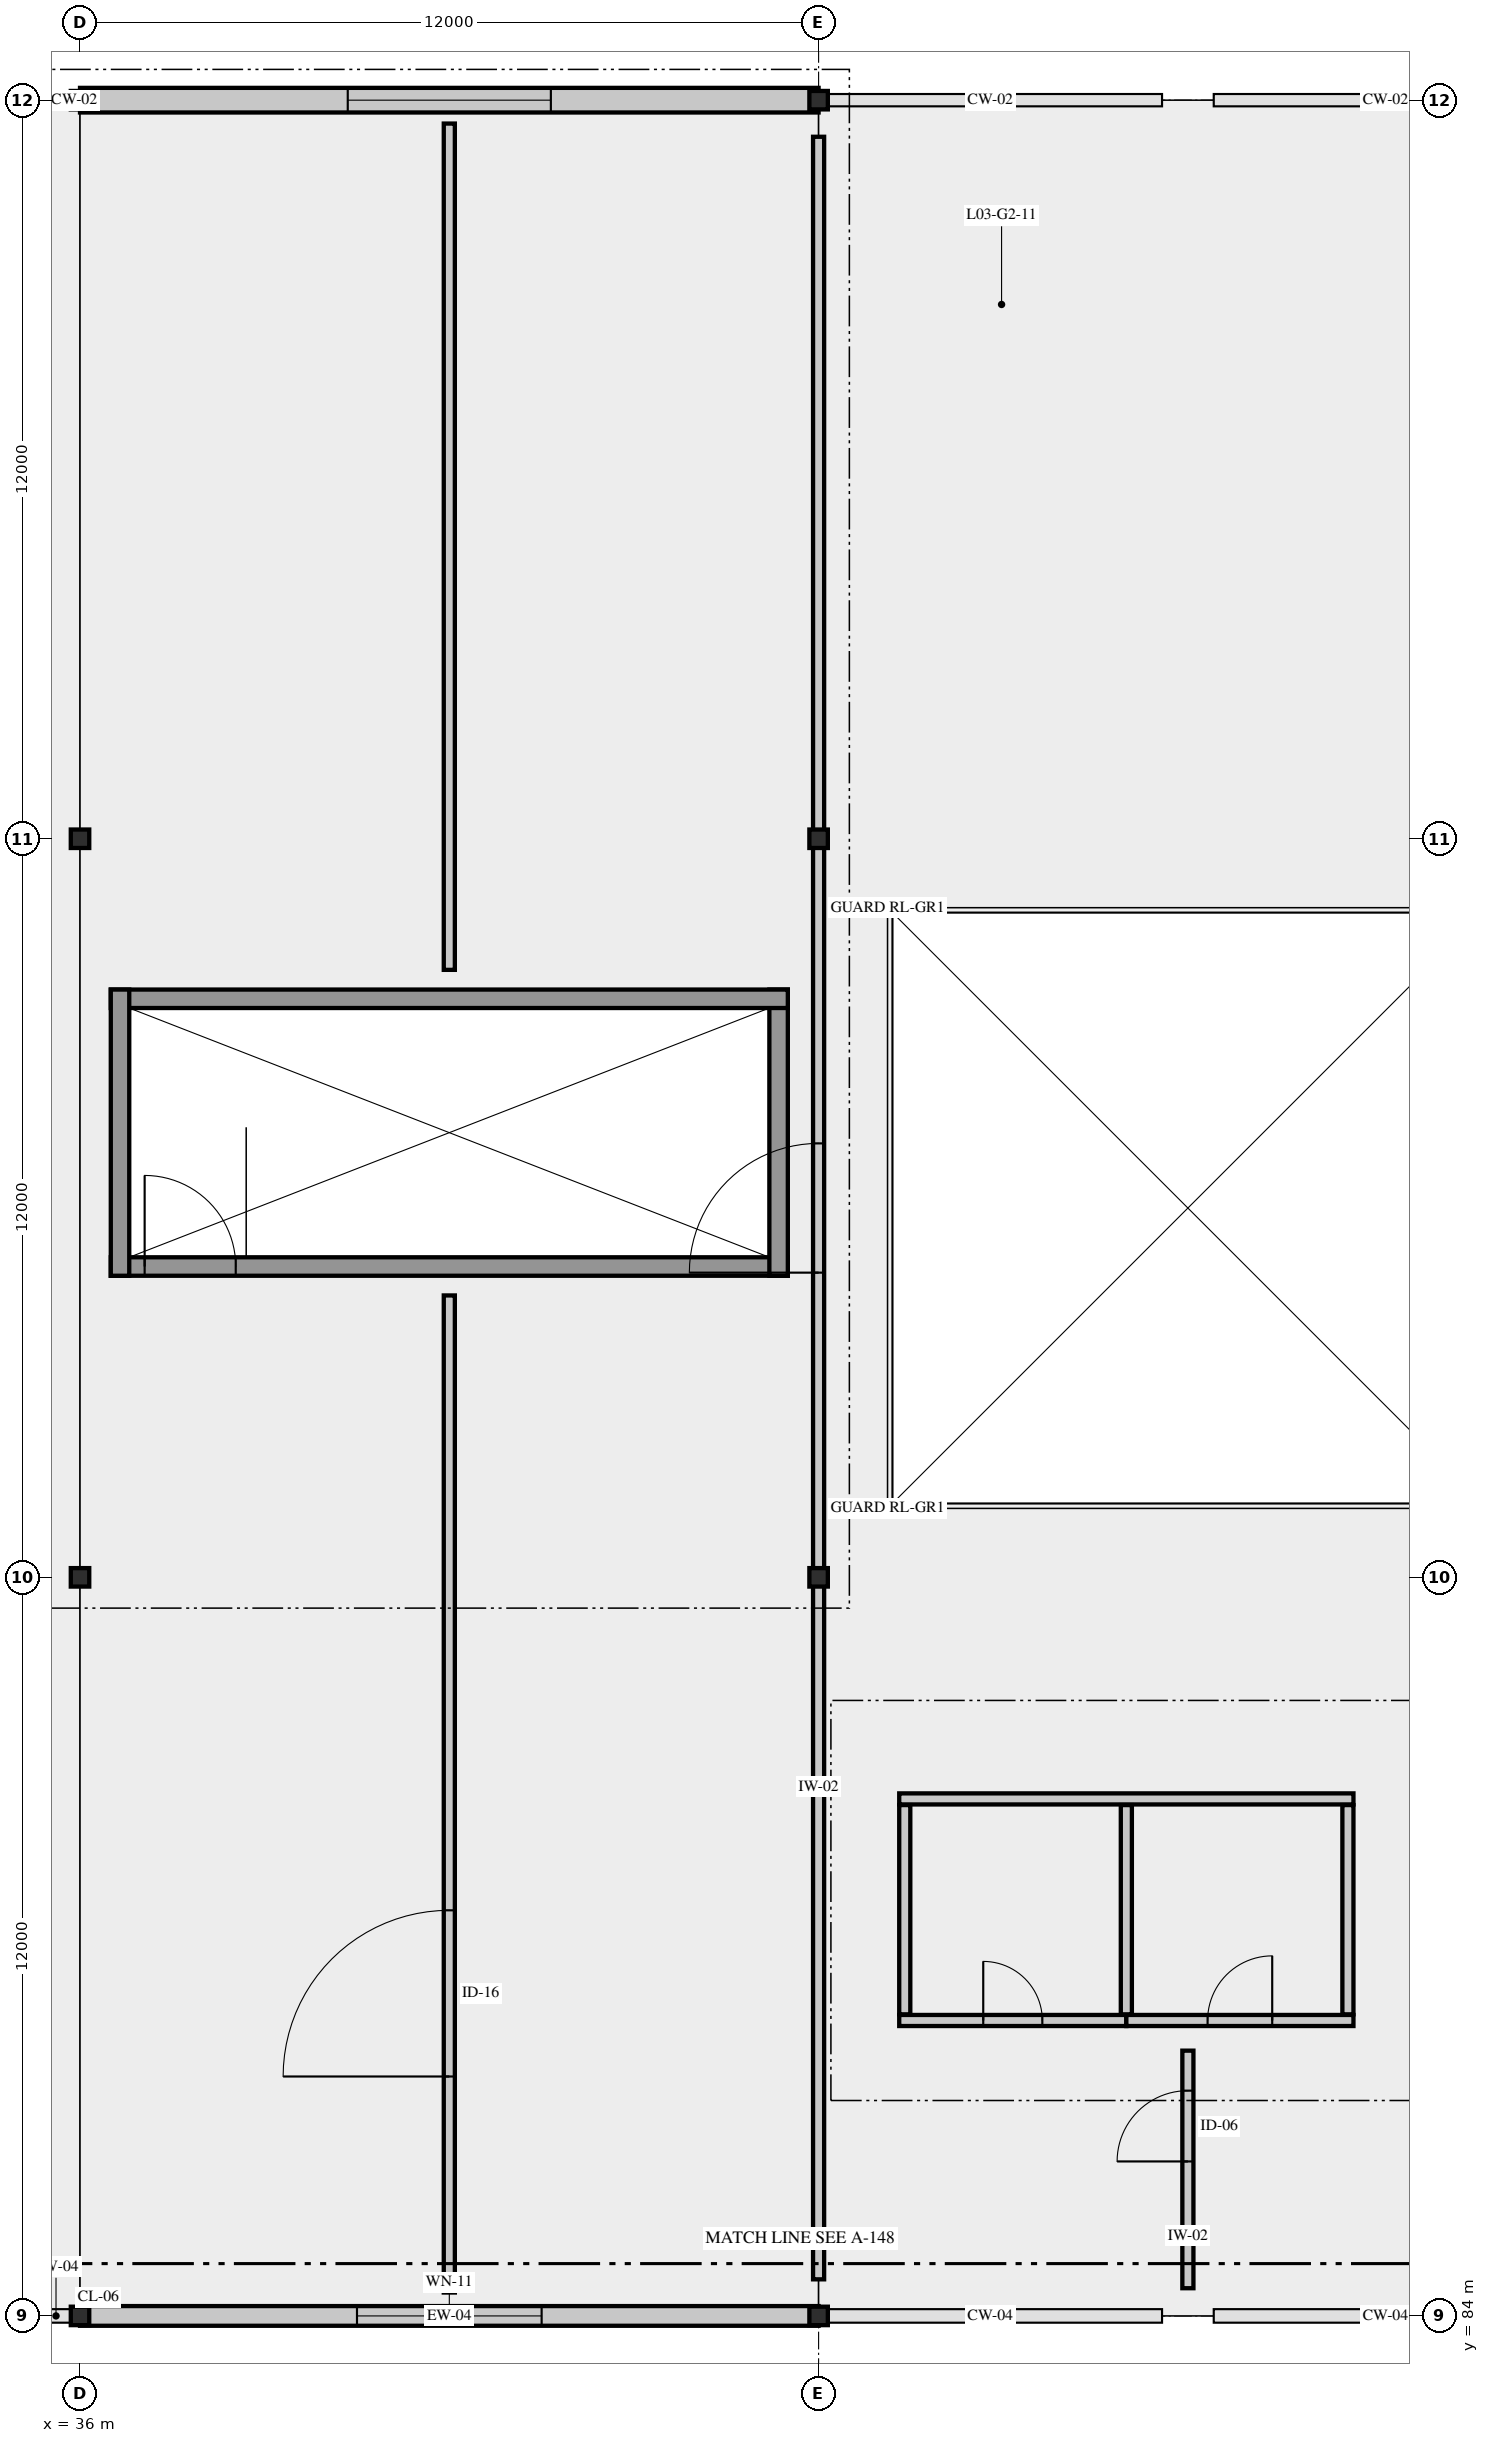
"""IFC4 building model, lengths in metres.
Left out: names, types, materials, properties, quantities, classifications, styles, units other than length and angle.
Written with IfcOpenShell. Run it as: python <this file> out.ifc"""

import sys

from ifc_helpers import new_model, si_unit, direction, frame, frame_2d, origin, origin_2d, place, context, subcontext, project, spatial, rectangle, i_section, extrude, element, fill, save


model = new_model("IFC4")
c1 = context("Model", 3, precision=1e-05, world=origin(), true_north=direction((0.0, 1.0)))
c2 = subcontext(c1, "Body", "Model", "MODEL_VIEW")
j1 = project(units=[si_unit("LENGTHUNIT", "METRE"), si_unit("PLANEANGLEUNIT", "RADIAN")], contexts=[c1])
p1 = place(None, origin())
s1 = spatial("IfcSite", under=j1, at=p1, CompositionType="ELEMENT")
p2 = place(p1, origin())
s2 = spatial("IfcBuilding", under=s1, at=p2, CompositionType="ELEMENT")
p3 = place(p2, frame((0.0, 0.0, 16.8)))
s3 = spatial("IfcBuildingStorey", under=s2, at=p3, CompositionType="ELEMENT", Elevation=16.8)
for number, where, z_axis, x_axis in (
    (1, (36.0, 84.0, 0.0), (0.0, 0.0, 1.0), (1.0, 0.0, 0.0)),
    (2, (36.0, 96.0, 0.0), (0.0, 0.0, 1.0), (1.0, 0.0, 0.0)),
    (3, (36.0, 108.0, 0.0), (0.0, 0.0, 1.0), (1.0, 0.0, 0.0)),
    (4, (36.0, 120.0, 0.0), (0.0, 0.0, 1.0), (1.0, 0.0, 0.0)),
    (5, (48.0, 84.0, 0.0), (0.0, 0.0, 1.0), (1.0, 0.0, 0.0)),
    (6, (48.0, 96.0, 0.0), (0.0, 0.0, 1.0), (1.0, 0.0, 0.0)),
    (7, (48.0, 108.0, 0.0), (0.0, 0.0, 1.0), (1.0, 0.0, 0.0)),
    (8, (48.0, 120.0, 0.0), (0.0, 0.0, 1.0), (1.0, 0.0, 0.0)),
):
    element("IfcColumn", number, at=place(p3, frame(where, z_axis=z_axis, x_axis=x_axis)), inside=s3, PredefinedType="COLUMN", context=c2, shape_type="SweptSolid", body=[
        extrude(i_section(OverallWidth=0.3, OverallDepth=0.3, WebThickness=0.011, FlangeThickness=0.019, FilletRadius=0.027, at=origin_2d()), origin(), (0.0, 0.0, 1.0), 6.6),
    ])
p4 = place(p3, frame((36.0, 84.0, 0.0), z_axis=(0.0, 0.0, 1.0), x_axis=(1.0, 0.0, 0.0)))
e9 = element("IfcWall", 9, at=p4, inside=s3, PredefinedType="SOLIDWALL", context=c2, shape_type="SweptSolid", body=[
    extrude(rectangle(XDim=12.0, YDim=0.32, at=frame_2d((6.0, 0.0))), origin(), (0.0, 0.0, 1.0), 5.6),
])
p5 = place(p4, frame((4.5, 0.0, 0.95)))
e10 = element("IfcOpeningElement", 10, at=p5, cuts=e9, PredefinedType="OPENING", context=c2, shape_type="SweptSolid", body=[
    extrude(rectangle(XDim=3.0, YDim=1.5, at=frame_2d((1.5, 0.75))), frame((0.0, 0.17, 0.0), z_axis=(0.0, -1.0, 0.0), x_axis=(1.0, 0.0, 0.0)), (0.0, 0.0, 1.0), 0.34),
])
p6 = place(p3, frame((48.0, 120.0, 0.0), z_axis=(0.0, 0.0, 1.0), x_axis=(-1.0, 0.0, 0.0)))
e11 = element("IfcWall", 11, at=p6, inside=s3, PredefinedType="SOLIDWALL", context=c2, shape_type="SweptSolid", body=[
    extrude(rectangle(XDim=12.0, YDim=0.4, at=frame_2d((6.0, 0.0))), origin(), (0.0, 0.0, 1.0), 5.75),
])
p7 = place(p6, frame((4.35, 0.0, 0.95)))
e12 = element("IfcOpeningElement", 12, at=p7, cuts=e11, PredefinedType="OPENING", context=c2, shape_type="SweptSolid", body=[
    extrude(rectangle(XDim=3.3, YDim=1.5, at=frame_2d((1.65, 0.75))), frame((0.0, 0.21, 0.0), z_axis=(0.0, -1.0, 0.0), x_axis=(1.0, 0.0, 0.0)), (0.0, 0.0, 1.0), 0.42),
])
p8 = place(p3, frame((36.5, 101.05, 0.0), z_axis=(0.0, 0.0, 1.0), x_axis=(1.0, 0.0, 0.0)))
e13 = element("IfcWall", 13, at=p8, inside=s3, PredefinedType="SHEAR", context=c2, shape_type="SweptSolid", body=[
    extrude(rectangle(XDim=11.0, YDim=0.3, at=frame_2d((5.5, 0.0))), origin(), (0.0, 0.0, 1.0), 6.35),
])
p9 = place(p8, frame((0.55, 0.0, 0.0)))
e14 = element("IfcOpeningElement", 14, at=p9, cuts=e13, PredefinedType="OPENING", context=c2, shape_type="SweptSolid", body=[
    extrude(rectangle(XDim=1.48, YDim=2.3, at=frame_2d((0.74, 1.15))), frame((0.0, 0.16, 0.0), z_axis=(0.0, -1.0, 0.0), x_axis=(1.0, 0.0, 0.0)), (0.0, 0.0, 1.0), 0.32),
])
p10 = place(p3, frame((47.35, 100.9, 0.0), z_axis=(0.0, 0.0, 1.0), x_axis=(0.0, 1.0, 0.0)))
e15 = element("IfcWall", 15, at=p10, inside=s3, PredefinedType="SHEAR", context=c2, shape_type="SweptSolid", body=[
    extrude(rectangle(XDim=4.65, YDim=0.3, at=frame_2d((2.325, 0.0))), origin(), (0.0, 0.0, 1.0), 6.35),
])
p11 = place(p3, frame((47.5, 105.4, 0.0), z_axis=(0.0, 0.0, 1.0), x_axis=(-1.0, 0.0, 0.0)))
e16 = element("IfcWall", 16, at=p11, inside=s3, PredefinedType="SHEAR", context=c2, shape_type="SweptSolid", body=[
    extrude(rectangle(XDim=11.0, YDim=0.3, at=frame_2d((5.5, 0.0))), origin(), (0.0, 0.0, 1.0), 6.35),
])
p12 = place(p3, frame((36.65, 105.55, 0.0), z_axis=(0.0, 0.0, 1.0), x_axis=(0.0, -1.0, 0.0)))
e17 = element("IfcWall", 17, at=p12, inside=s3, PredefinedType="SHEAR", context=c2, shape_type="SweptSolid", body=[
    extrude(rectangle(XDim=4.65, YDim=0.3, at=frame_2d((2.325, 0.0))), origin(), (0.0, 0.0, 1.0), 6.35),
])
p13 = place(p3, frame((49.31, 92.4, 0.0), z_axis=(0.0, 0.0, 1.0), x_axis=(1.0, 0.0, 0.0)))
e18 = element("IfcWall", 18, at=p13, inside=s3, PredefinedType="PARTITIONING", context=c2, shape_type="SweptSolid", body=[
    extrude(rectangle(XDim=7.38, YDim=0.18, at=frame_2d((3.69, 0.0))), origin(), (0.0, 0.0, 1.0), 6.31),
])
p14 = place(p3, frame((49.31, 88.8, 0.0), z_axis=(0.0, 0.0, 1.0), x_axis=(1.0, 0.0, 0.0)))
e19 = element("IfcWall", 19, at=p14, inside=s3, PredefinedType="PARTITIONING", context=c2, shape_type="SweptSolid", body=[
    extrude(rectangle(XDim=3.69, YDim=0.18, at=frame_2d((1.845, 0.0))), origin(), (0.0, 0.0, 1.0), 6.31),
])
p15 = place(p14, frame((1.365, 0.0, 0.0)))
e20 = element("IfcOpeningElement", 20, at=p15, cuts=e19, PredefinedType="OPENING", context=c2, shape_type="SweptSolid", body=[
    extrude(rectangle(XDim=0.96, YDim=2.15, at=frame_2d((0.48, 1.075))), frame((0.0, 0.1, 0.0), z_axis=(0.0, -1.0, 0.0), x_axis=(1.0, 0.0, 0.0)), (0.0, 0.0, 1.0), 0.2),
])
p16 = place(p3, frame((53.0, 88.8, 0.0), z_axis=(0.0, 0.0, 1.0), x_axis=(1.0, 0.0, 0.0)))
e21 = element("IfcWall", 21, at=p16, inside=s3, PredefinedType="PARTITIONING", context=c2, shape_type="SweptSolid", body=[
    extrude(rectangle(XDim=3.69, YDim=0.18, at=frame_2d((1.845, 0.0))), origin(), (0.0, 0.0, 1.0), 6.31),
])
p17 = place(p16, frame((1.32, 0.0, 0.0)))
e22 = element("IfcOpeningElement", 22, at=p17, cuts=e21, PredefinedType="OPENING", context=c2, shape_type="SweptSolid", body=[
    extrude(rectangle(XDim=1.05, YDim=2.2, at=frame_2d((0.525, 1.1))), frame((0.0, 0.1, 0.0), z_axis=(0.0, -1.0, 0.0), x_axis=(1.0, 0.0, 0.0)), (0.0, 0.0, 1.0), 0.2),
])
for number, where, z_axis, x_axis in (
    (23, (49.4, 88.9, 0.0), (0.0, 0.0, 1.0), (0.0, 1.0, 0.0)),
    (24, (56.6, 88.9, 0.0), (0.0, 0.0, 1.0), (0.0, 1.0, 0.0)),
    (25, (53.0, 88.9, 0.0), (0.0, 0.0, 1.0), (0.0, 1.0, 0.0)),
):
    element("IfcWall", number, at=place(p3, frame(where, z_axis=z_axis, x_axis=x_axis)), inside=s3, PredefinedType="PARTITIONING", context=c2, shape_type="SweptSolid", body=[
        extrude(rectangle(XDim=3.4, YDim=0.18, at=frame_2d((1.7, 0.0))), origin(), (0.0, 0.0, 1.0), 6.31),
    ])
p18 = place(p3, frame((42.0, 84.38, 0.0), z_axis=(0.0, 0.0, 1.0), x_axis=(0.0, 1.0, 0.0)))
e26 = element("IfcWall", 26, at=p18, inside=s3, PredefinedType="PARTITIONING", context=c2, shape_type="SweptSolid", body=[
    extrude(rectangle(XDim=16.2, YDim=0.18, at=frame_2d((8.1, 0.0))), origin(), (0.0, 0.0, 1.0), 5.87),
])
p19 = place(p18, frame((3.51, 0.0, 0.0)))
e27 = element("IfcOpeningElement", 27, at=p19, cuts=e26, PredefinedType="OPENING", context=c2, shape_type="SweptSolid", body=[
    extrude(rectangle(XDim=2.7, YDim=2.85, at=frame_2d((1.35, 1.425))), frame((0.0, 0.1, 0.0), z_axis=(0.0, -1.0, 0.0), x_axis=(1.0, 0.0, 0.0)), (0.0, 0.0, 1.0), 0.2),
])
p20 = place(p3, frame((42.0, 105.87, 0.0), z_axis=(0.0, 0.0, 1.0), x_axis=(0.0, 1.0, 0.0)))
e28 = element("IfcWall", 28, at=p20, inside=s3, PredefinedType="PARTITIONING", context=c2, shape_type="SweptSolid", body=[
    extrude(rectangle(XDim=13.75, YDim=0.18, at=frame_2d((6.875, 0.0))), origin(), (0.0, 0.0, 1.0), 5.87),
])
p21 = place(p3, frame((48.0, 84.594, 0.0), z_axis=(0.0, 0.0, 1.0), x_axis=(0.0, 1.0, 0.0)))
e29 = element("IfcWall", 29, at=p21, inside=s3, PredefinedType="PARTITIONING", context=c2, shape_type="SweptSolid", body=[
    extrude(rectangle(XDim=34.811, YDim=0.18, at=frame_2d((17.406, 0.0))), origin(), (0.0, 0.0, 1.0), 5.82),
])
p22 = place(p21, frame((16.356, 0.0, 0.0)))
e30 = element("IfcOpeningElement", 30, at=p22, cuts=e29, PredefinedType="OPENING", context=c2, shape_type="SweptSolid", body=[
    extrude(rectangle(XDim=2.1, YDim=2.5, at=frame_2d((1.05, 1.25))), frame((0.0, 0.1, 0.0), z_axis=(0.0, -1.0, 0.0), x_axis=(1.0, 0.0, 0.0)), (0.0, 0.0, 1.0), 0.2),
])
p23 = place(p3, frame((54.0, 84.45, 0.0), z_axis=(0.0, 0.0, 1.0), x_axis=(0.0, 1.0, 0.0)))
e31 = element("IfcWall", 31, at=p23, inside=s3, PredefinedType="PARTITIONING", context=c2, shape_type="SweptSolid", body=[
    extrude(rectangle(XDim=3.86, YDim=0.18, at=frame_2d((1.93, 0.0))), origin(), (0.0, 0.0, 1.0), 6.31),
])
p24 = place(p23, frame((2.06, 0.0, 0.0)))
e32 = element("IfcOpeningElement", 32, at=p24, cuts=e31, PredefinedType="OPENING", context=c2, shape_type="SweptSolid", body=[
    extrude(rectangle(XDim=1.15, YDim=2.25, at=frame_2d((0.575, 1.125))), frame((0.0, 0.1, 0.0), z_axis=(0.0, -1.0, 0.0), x_axis=(1.0, 0.0, 0.0)), (0.0, 0.0, 1.0), 0.2),
])
p25 = place(p5, origin())
e33 = element("IfcWindow", 33, at=p25, inside=s3, PartitioningType="SINGLE_PANEL", PredefinedType="WINDOW", context=c2, shape_type="SweptSolid", body=[
    extrude(rectangle(XDim=3.0, YDim=1.5, at=frame_2d((1.5, 0.75))), frame((0.0, 0.03, 0.0), z_axis=(0.0, -1.0, 0.0), x_axis=(1.0, 0.0, 0.0)), (0.0, 0.0, 1.0), 0.06),
])
fill(e10, e33)
p26 = place(p7, origin())
e34 = element("IfcWindow", 34, at=p26, inside=s3, PartitioningType="SINGLE_PANEL", PredefinedType="WINDOW", context=c2, shape_type="SweptSolid", body=[
    extrude(rectangle(XDim=3.3, YDim=1.5, at=frame_2d((1.65, 0.75))), frame((0.0, 0.03, 0.0), z_axis=(0.0, -1.0, 0.0), x_axis=(1.0, 0.0, 0.0)), (0.0, 0.0, 1.0), 0.06),
])
fill(e12, e34)
p27 = place(p9, origin())
e35 = element("IfcDoor", 35, at=p27, inside=s3, OperationType="DOUBLE_DOOR_SINGLE_SWING", PredefinedType="DOOR", context=c2, shape_type="SweptSolid", body=[
    extrude(rectangle(XDim=1.48, YDim=2.3, at=frame_2d((0.74, 1.15))), frame((0.0, 0.025, 0.0), z_axis=(0.0, -1.0, 0.0), x_axis=(1.0, 0.0, 0.0)), (0.0, 0.0, 1.0), 0.05),
])
fill(e14, e35)
p28 = place(p15, origin())
e36 = element("IfcDoor", 36, at=p28, inside=s3, OperationType="SINGLE_SWING_LEFT", PredefinedType="DOOR", context=c2, shape_type="SweptSolid", body=[
    extrude(rectangle(XDim=0.96, YDim=2.15, at=frame_2d((0.48, 1.075))), frame((0.0, 0.025, 0.0), z_axis=(0.0, -1.0, 0.0), x_axis=(1.0, 0.0, 0.0)), (0.0, 0.0, 1.0), 0.05),
])
fill(e20, e36)
p29 = place(p17, origin())
e37 = element("IfcDoor", 37, at=p29, inside=s3, OperationType="SINGLE_SWING_RIGHT", PredefinedType="DOOR", context=c2, shape_type="SweptSolid", body=[
    extrude(rectangle(XDim=1.05, YDim=2.2, at=frame_2d((0.525, 1.1))), frame((0.0, 0.025, 0.0), z_axis=(0.0, -1.0, 0.0), x_axis=(1.0, 0.0, 0.0)), (0.0, 0.0, 1.0), 0.05),
])
fill(e22, e37)
p30 = place(p19, origin())
e38 = element("IfcDoor", 38, at=p30, inside=s3, OperationType="DOUBLE_DOOR_SINGLE_SWING", PredefinedType="DOOR", context=c2, shape_type="SweptSolid", body=[
    extrude(rectangle(XDim=2.7, YDim=2.85, at=frame_2d((1.35, 1.425))), frame((0.0, 0.025, 0.0), z_axis=(0.0, -1.0, 0.0), x_axis=(1.0, 0.0, 0.0)), (0.0, 0.0, 1.0), 0.05),
])
fill(e27, e38)
p31 = place(p22, origin())
e39 = element("IfcDoor", 39, at=p31, inside=s3, OperationType="DOUBLE_DOOR_SINGLE_SWING", PredefinedType="DOOR", context=c2, shape_type="SweptSolid", body=[
    extrude(rectangle(XDim=2.1, YDim=2.5, at=frame_2d((1.05, 1.25))), frame((0.0, 0.025, 0.0), z_axis=(0.0, -1.0, 0.0), x_axis=(1.0, 0.0, 0.0)), (0.0, 0.0, 1.0), 0.05),
])
fill(e30, e39)
p32 = place(p24, origin())
e40 = element("IfcDoor", 40, at=p32, inside=s3, OperationType="SINGLE_SWING_LEFT", PredefinedType="DOOR", context=c2, shape_type="SweptSolid", body=[
    extrude(rectangle(XDim=1.15, YDim=2.25, at=frame_2d((0.575, 1.125))), frame((0.0, 0.025, 0.0), z_axis=(0.0, -1.0, 0.0), x_axis=(1.0, 0.0, 0.0)), (0.0, 0.0, 1.0), 0.05),
])
fill(e32, e40)
save(model, sys.argv[1])
